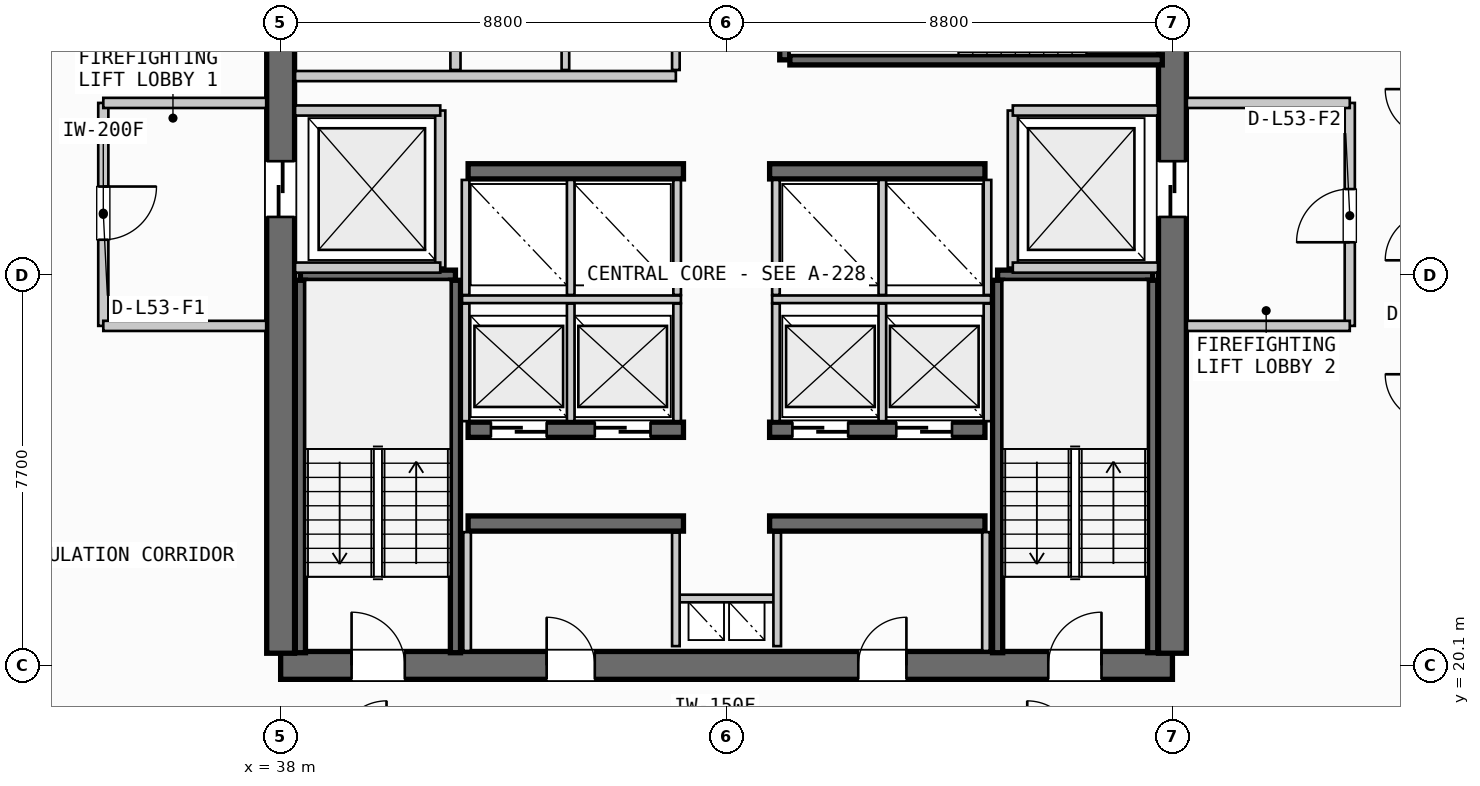
"""IFC4 building model, lengths in metres.
Left out: names, types, materials, properties, quantities, classifications, styles, units other than length and angle.
Written with IfcOpenShell. Run it as: python <this file> out.ifc"""

import sys

from ifc_helpers import new_model, si_unit, direction, frame, frame_2d, origin, place, context, subcontext, project, spatial, rectangle, extrude, source, transform, mapped, element, fill, save


model = new_model("IFC4")
c1 = context("Model", 3, precision=1e-05, world=origin(), true_north=direction((0.0, 1.0)))
c2 = subcontext(c1, "Body", "Model", "MODEL_VIEW")
j1 = project(units=[si_unit("LENGTHUNIT", "METRE"), si_unit("PLANEANGLEUNIT", "RADIAN")], contexts=[c1])
p1 = place(None, origin())
s1 = spatial("IfcSite", under=j1, at=p1, CompositionType="ELEMENT")
p2 = place(p1, origin())
s2 = spatial("IfcBuilding", under=s1, at=p2, CompositionType="ELEMENT")
p3 = place(p2, frame((0.0, 0.0, 204.4)))
s3 = spatial("IfcBuildingStorey", under=s2, at=p3, CompositionType="ELEMENT", Elevation=204.4)
p4 = place(p3, frame((38.0, 20.1, 0.0), z_axis=(0.0, 0.0, 1.0), x_axis=(1.0, 0.0, 0.0)))
e1 = element("IfcWall", 1, at=p4, inside=s3, PredefinedType="SHEAR", context=c2, shape_type="SweptSolid", body=[
    extrude(rectangle(XDim=17.6, YDim=0.55, at=frame_2d((8.8, 0.0))), origin(), (0.0, 0.0, 1.0), 3.26),
])
p5 = place(p4, frame((1.4, 0.0, 0.0)))
e2 = element("IfcOpeningElement", 2, at=p5, cuts=e1, PredefinedType="OPENING", context=c2, shape_type="SweptSolid", body=[
    extrude(rectangle(XDim=1.05, YDim=2.15, at=frame_2d((0.525, 1.075))), frame((0.0, 0.285, 0.0), z_axis=(0.0, -1.0, 0.0), x_axis=(1.0, 0.0, 0.0)), (0.0, 0.0, 1.0), 0.57),
])
p6 = place(p4, frame((15.15, 0.0, 0.0)))
e3 = element("IfcOpeningElement", 3, at=p6, cuts=e1, PredefinedType="OPENING", context=c2, shape_type="SweptSolid", body=[
    extrude(rectangle(XDim=1.05, YDim=2.15, at=frame_2d((0.525, 1.075))), frame((0.0, 0.285, 0.0), z_axis=(0.0, -1.0, 0.0), x_axis=(1.0, 0.0, 0.0)), (0.0, 0.0, 1.0), 0.57),
])
p7 = place(p4, frame((5.25, 0.0, 0.0)))
e4 = element("IfcOpeningElement", 4, at=p7, cuts=e1, PredefinedType="OPENING", context=c2, shape_type="SweptSolid", body=[
    extrude(rectangle(XDim=0.95, YDim=2.15, at=frame_2d((0.475, 1.075))), frame((0.0, 0.285, 0.0), z_axis=(0.0, -1.0, 0.0), x_axis=(1.0, 0.0, 0.0)), (0.0, 0.0, 1.0), 0.57),
])
p8 = place(p4, frame((11.4, 0.0, 0.0)))
e5 = element("IfcOpeningElement", 5, at=p8, cuts=e1, PredefinedType="OPENING", context=c2, shape_type="SweptSolid", body=[
    extrude(rectangle(XDim=0.95, YDim=2.15, at=frame_2d((0.475, 1.075))), frame((0.0, 0.285, 0.0), z_axis=(0.0, -1.0, 0.0), x_axis=(1.0, 0.0, 0.0)), (0.0, 0.0, 1.0), 0.57),
])
p9 = place(p3, frame((38.0, 35.26, 0.0), z_axis=(0.0, 0.0, 1.0), x_axis=(0.0, -1.0, 0.0)))
e6 = element("IfcWall", 6, at=p9, inside=s3, PredefinedType="SHEAR", context=c2, shape_type="SweptSolid", body=[
    extrude(rectangle(XDim=14.92, YDim=0.55, at=frame_2d((7.46, 0.0))), origin(), (0.0, 0.0, 1.0), 3.26),
])
p10 = place(p9, frame((5.21, 0.0, 0.0)))
e7 = element("IfcOpeningElement", 7, at=p10, cuts=e6, PredefinedType="OPENING", context=c2, shape_type="SweptSolid", body=[
    extrude(rectangle(XDim=1.1, YDim=2.2, at=frame_2d((0.55, 1.1))), frame((0.0, 0.285, 0.0), z_axis=(0.0, -1.0, 0.0), x_axis=(1.0, 0.0, 0.0)), (0.0, 0.0, 1.0), 0.57),
])
p11 = place(p3, frame((55.6, 20.34, 0.0), z_axis=(0.0, 0.0, 1.0), x_axis=(0.0, 1.0, 0.0)))
e8 = element("IfcWall", 8, at=p11, inside=s3, PredefinedType="SHEAR", context=c2, shape_type="SweptSolid", body=[
    extrude(rectangle(XDim=14.92, YDim=0.55, at=frame_2d((7.46, 0.0))), origin(), (0.0, 0.0, 1.0), 3.26),
])
p12 = place(p11, frame((12.71, 0.0, 0.0)))
e9 = element("IfcOpeningElement", 9, at=p12, cuts=e8, PredefinedType="OPENING", context=c2, shape_type="SweptSolid", body=[
    extrude(rectangle(XDim=1.05, YDim=2.15, at=frame_2d((0.525, 1.075))), frame((0.0, 0.285, 0.0), z_axis=(0.0, -1.0, 0.0), x_axis=(1.0, 0.0, 0.0)), (0.0, 0.0, 1.0), 0.57),
])
p13 = place(p11, frame((8.61, 0.0, 0.0)))
e10 = element("IfcOpeningElement", 10, at=p13, cuts=e8, PredefinedType="OPENING", context=c2, shape_type="SweptSolid", body=[
    extrude(rectangle(XDim=1.1, YDim=2.2, at=frame_2d((0.55, 1.1))), frame((0.0, 0.285, 0.0), z_axis=(0.0, -1.0, 0.0), x_axis=(1.0, 0.0, 0.0)), (0.0, 0.0, 1.0), 0.57),
])
for number, where, z_axis, x_axis in (
    (11, (41.7, 22.9, 0.0), (0.0, 0.0, 1.0), (1.0, 0.0, 0.0)),
    (12, (47.65, 22.9, 0.0), (0.0, 0.0, 1.0), (1.0, 0.0, 0.0)),
):
    element("IfcWall", number, at=place(p3, frame(where, z_axis=z_axis, x_axis=x_axis)), inside=s3, PredefinedType="SHEAR", context=c2, shape_type="SweptSolid", body=[
        extrude(rectangle(XDim=4.25, YDim=0.3, at=frame_2d((2.125, 0.0))), origin(), (0.0, 0.0, 1.0), 3.26),
    ])
p14 = place(p3, frame((41.7, 24.75, 0.0), z_axis=(0.0, 0.0, 1.0), x_axis=(1.0, 0.0, 0.0)))
e13 = element("IfcWall", 13, at=p14, inside=s3, PredefinedType="SHEAR", context=c2, shape_type="SweptSolid", body=[
    extrude(rectangle(XDim=4.25, YDim=0.3, at=frame_2d((2.125, 0.0))), origin(), (0.0, 0.0, 1.0), 3.26),
])
p15 = place(p14, frame((0.45, 0.0, 0.0)))
e14 = element("IfcOpeningElement", 14, at=p15, cuts=e13, PredefinedType="OPENING", context=c2, shape_type="SweptSolid", body=[
    extrude(rectangle(XDim=1.1, YDim=2.2, at=frame_2d((0.55, 1.1))), frame((0.0, 0.16, 0.0), z_axis=(0.0, -1.0, 0.0), x_axis=(1.0, 0.0, 0.0)), (0.0, 0.0, 1.0), 0.32),
])
p16 = place(p14, frame((2.5, 0.0, 0.0)))
e15 = element("IfcOpeningElement", 15, at=p16, cuts=e13, PredefinedType="OPENING", context=c2, shape_type="SweptSolid", body=[
    extrude(rectangle(XDim=1.1, YDim=2.2, at=frame_2d((0.55, 1.1))), frame((0.0, 0.16, 0.0), z_axis=(0.0, -1.0, 0.0), x_axis=(1.0, 0.0, 0.0)), (0.0, 0.0, 1.0), 0.32),
])
p17 = place(p3, frame((47.65, 24.75, 0.0), z_axis=(0.0, 0.0, 1.0), x_axis=(1.0, 0.0, 0.0)))
e16 = element("IfcWall", 16, at=p17, inside=s3, PredefinedType="SHEAR", context=c2, shape_type="SweptSolid", body=[
    extrude(rectangle(XDim=4.25, YDim=0.3, at=frame_2d((2.125, 0.0))), origin(), (0.0, 0.0, 1.0), 3.26),
])
p18 = place(p17, frame((0.45, 0.0, 0.0)))
e17 = element("IfcOpeningElement", 17, at=p18, cuts=e16, PredefinedType="OPENING", context=c2, shape_type="SweptSolid", body=[
    extrude(rectangle(XDim=1.1, YDim=2.2, at=frame_2d((0.55, 1.1))), frame((0.0, 0.16, 0.0), z_axis=(0.0, -1.0, 0.0), x_axis=(1.0, 0.0, 0.0)), (0.0, 0.0, 1.0), 0.32),
])
p19 = place(p17, frame((2.5, 0.0, 0.0)))
e18 = element("IfcOpeningElement", 18, at=p19, cuts=e16, PredefinedType="OPENING", context=c2, shape_type="SweptSolid", body=[
    extrude(rectangle(XDim=1.1, YDim=2.2, at=frame_2d((0.55, 1.1))), frame((0.0, 0.16, 0.0), z_axis=(0.0, -1.0, 0.0), x_axis=(1.0, 0.0, 0.0)), (0.0, 0.0, 1.0), 0.32),
])
for number, where, z_axis, x_axis in (
    (19, (41.7, 29.85, 0.0), (0.0, 0.0, 1.0), (1.0, 0.0, 0.0)),
    (20, (47.65, 29.85, 0.0), (0.0, 0.0, 1.0), (1.0, 0.0, 0.0)),
):
    element("IfcWall", number, at=place(p3, frame(where, z_axis=z_axis, x_axis=x_axis)), inside=s3, PredefinedType="SHEAR", context=c2, shape_type="SweptSolid", body=[
        extrude(rectangle(XDim=4.25, YDim=0.3, at=frame_2d((2.125, 0.0))), origin(), (0.0, 0.0, 1.0), 3.26),
    ])
p20 = place(p3, frame((38.39, 27.8, 0.0), z_axis=(0.0, 0.0, 1.0), x_axis=(1.0, 0.0, 0.0)))
e21 = element("IfcWall", 21, at=p20, inside=s3, PredefinedType="SHEAR", context=c2, shape_type="SweptSolid", body=[
    extrude(rectangle(XDim=3.06, YDim=0.2, at=frame_2d((1.53, 0.0))), origin(), (0.0, 0.0, 1.0), 3.26),
])
for number, where, z_axis, x_axis in (
    (22, (41.45, 27.7, 0.0), (0.0, 0.0, 1.0), (0.0, -1.0, 0.0)),
    (23, (38.39, 20.35, 0.0), (0.0, 0.0, 1.0), (0.0, 1.0, 0.0)),
):
    element("IfcWall", number, at=place(p3, frame(where, z_axis=z_axis, x_axis=x_axis)), inside=s3, PredefinedType="SHEAR", context=c2, shape_type="SweptSolid", body=[
        extrude(rectangle(XDim=7.35, YDim=0.2, at=frame_2d((3.675, 0.0))), origin(), (0.0, 0.0, 1.0), 3.26),
    ])
p21 = place(p3, frame((52.15, 27.8, 0.0), z_axis=(0.0, 0.0, 1.0), x_axis=(1.0, 0.0, 0.0)))
e24 = element("IfcWall", 24, at=p21, inside=s3, PredefinedType="SHEAR", context=c2, shape_type="SweptSolid", body=[
    extrude(rectangle(XDim=3.06, YDim=0.2, at=frame_2d((1.53, 0.0))), origin(), (0.0, 0.0, 1.0), 3.26),
])
for number, where, z_axis, x_axis in (
    (25, (55.21, 27.7, 0.0), (0.0, 0.0, 1.0), (0.0, -1.0, 0.0)),
    (26, (52.15, 20.35, 0.0), (0.0, 0.0, 1.0), (0.0, 1.0, 0.0)),
):
    element("IfcWall", number, at=place(p3, frame(where, z_axis=z_axis, x_axis=x_axis)), inside=s3, PredefinedType="SHEAR", context=c2, shape_type="SweptSolid", body=[
        extrude(rectangle(XDim=7.35, YDim=0.2, at=frame_2d((3.675, 0.0))), origin(), (0.0, 0.0, 1.0), 3.26),
    ])
p22 = place(p3, frame((47.95, 32.05, 0.0), z_axis=(0.0, 0.0, 1.0), x_axis=(0.0, 1.0, 0.0)))
e27 = element("IfcWall", 27, at=p22, inside=s3, PredefinedType="SHEAR", context=c2, shape_type="SweptSolid", body=[
    extrude(rectangle(XDim=3.06, YDim=0.2, at=frame_2d((1.53, 0.0))), origin(), (0.0, 0.0, 1.0), 3.26),
])
p23 = place(p3, frame((55.4, 32.05, 0.0), z_axis=(0.0, 0.0, 1.0), x_axis=(-1.0, 0.0, 0.0)))
e28 = element("IfcWall", 28, at=p23, inside=s3, PredefinedType="SHEAR", context=c2, shape_type="SweptSolid", body=[
    extrude(rectangle(XDim=7.35, YDim=0.2, at=frame_2d((3.675, 0.0))), origin(), (0.0, 0.0, 1.0), 3.26),
])
p24 = place(p3, frame((45.8, 21.42, 0.0), z_axis=(0.0, 0.0, 1.0), x_axis=(1.0, 0.0, 0.0)))
e29 = element("IfcWall", 29, at=p24, inside=s3, PredefinedType="PARTITIONING", context=c2, shape_type="SweptSolid", body=[
    extrude(rectangle(XDim=2.0, YDim=0.15, at=frame_2d((1.0, 0.0))), origin(), (0.0, 0.0, 1.0), 2.595),
])
for number, where, z_axis, x_axis in (
    (30, (45.8, 20.48, 0.0), (0.0, 0.0, 1.0), (0.0, 1.0, 0.0)),
    (31, (47.8, 20.48, 0.0), (0.0, 0.0, 1.0), (0.0, 1.0, 0.0)),
):
    element("IfcWall", number, at=place(p3, frame(where, z_axis=z_axis, x_axis=x_axis)), inside=s3, PredefinedType="PARTITIONING", context=c2, shape_type="SweptSolid", body=[
        extrude(rectangle(XDim=2.24, YDim=0.15, at=frame_2d((1.12, 0.0))), origin(), (0.0, 0.0, 1.0), 2.595),
    ])
p25 = place(p3, frame((41.15, 27.95, 0.0), z_axis=(0.0, 0.0, 1.0), x_axis=(0.0, 1.0, 0.0)))
e32 = element("IfcWall", 32, at=p25, inside=s3, PredefinedType="PARTITIONING", context=c2, shape_type="SweptSolid", body=[
    extrude(rectangle(XDim=3.1, YDim=0.2, at=frame_2d((1.55, 0.0))), origin(), (0.0, 0.0, 1.0), 2.595),
])
for number, where, z_axis, x_axis in (
    (33, (38.285, 27.95, 0.0), (0.0, 0.0, 1.0), (1.0, 0.0, 0.0)),
    (34, (38.285, 31.05, 0.0), (0.0, 0.0, 1.0), (1.0, 0.0, 0.0)),
):
    element("IfcWall", number, at=place(p3, frame(where, z_axis=z_axis, x_axis=x_axis)), inside=s3, PredefinedType="PARTITIONING", context=c2, shape_type="SweptSolid", body=[
        extrude(rectangle(XDim=2.865, YDim=0.2, at=frame_2d((1.433, 0.0))), origin(), (0.0, 0.0, 1.0), 2.595),
    ])
p26 = place(p3, frame((34.5, 31.2, 0.0), z_axis=(0.0, 0.0, 1.0), x_axis=(0.0, -1.0, 0.0)))
e35 = element("IfcWall", 35, at=p26, inside=s3, PredefinedType="PARTITIONING", context=c2, shape_type="SweptSolid", body=[
    extrude(rectangle(XDim=4.4, YDim=0.2, at=frame_2d((2.2, 0.0))), origin(), (0.0, 0.0, 1.0), 2.595),
])
p27 = place(p26, frame((1.65, 0.0, 0.0)))
e36 = element("IfcOpeningElement", 36, at=p27, cuts=e35, PredefinedType="OPENING", context=c2, shape_type="SweptSolid", body=[
    extrude(rectangle(XDim=1.05, YDim=2.15, at=frame_2d((0.525, 1.075))), frame((0.0, 0.11, 0.0), z_axis=(0.0, -1.0, 0.0), x_axis=(1.0, 0.0, 0.0)), (0.0, 0.0, 1.0), 0.22),
])
for number, where, z_axis, x_axis in (
    (37, (34.5, 26.8, 0.0), (0.0, 0.0, 1.0), (1.0, 0.0, 0.0)),
    (38, (34.5, 31.2, 0.0), (0.0, 0.0, 1.0), (1.0, 0.0, 0.0)),
):
    element("IfcWall", number, at=place(p3, frame(where, z_axis=z_axis, x_axis=x_axis)), inside=s3, PredefinedType="PARTITIONING", context=c2, shape_type="SweptSolid", body=[
        extrude(rectangle(XDim=3.215, YDim=0.2, at=frame_2d((1.607, 0.0))), origin(), (0.0, 0.0, 1.0), 2.595),
    ])
p28 = place(p3, frame((52.45, 27.95, 0.0), z_axis=(0.0, 0.0, 1.0), x_axis=(0.0, 1.0, 0.0)))
e39 = element("IfcWall", 39, at=p28, inside=s3, PredefinedType="PARTITIONING", context=c2, shape_type="SweptSolid", body=[
    extrude(rectangle(XDim=3.1, YDim=0.2, at=frame_2d((1.55, 0.0))), origin(), (0.0, 0.0, 1.0), 2.595),
])
for number, where, z_axis, x_axis in (
    (40, (52.45, 27.95, 0.0), (0.0, 0.0, 1.0), (1.0, 0.0, 0.0)),
    (41, (52.45, 31.05, 0.0), (0.0, 0.0, 1.0), (1.0, 0.0, 0.0)),
):
    element("IfcWall", number, at=place(p3, frame(where, z_axis=z_axis, x_axis=x_axis)), inside=s3, PredefinedType="PARTITIONING", context=c2, shape_type="SweptSolid", body=[
        extrude(rectangle(XDim=2.865, YDim=0.2, at=frame_2d((1.433, 0.0))), origin(), (0.0, 0.0, 1.0), 2.595),
    ])
p29 = place(p3, frame((59.1, 26.8, 0.0), z_axis=(0.0, 0.0, 1.0), x_axis=(0.0, 1.0, 0.0)))
e42 = element("IfcWall", 42, at=p29, inside=s3, PredefinedType="PARTITIONING", context=c2, shape_type="SweptSolid", body=[
    extrude(rectangle(XDim=4.4, YDim=0.2, at=frame_2d((2.2, 0.0))), origin(), (0.0, 0.0, 1.0), 2.595),
])
p30 = place(p29, frame((1.65, 0.0, 0.0)))
e43 = element("IfcOpeningElement", 43, at=p30, cuts=e42, PredefinedType="OPENING", context=c2, shape_type="SweptSolid", body=[
    extrude(rectangle(XDim=1.05, YDim=2.15, at=frame_2d((0.525, 1.075))), frame((0.0, 0.11, 0.0), z_axis=(0.0, -1.0, 0.0), x_axis=(1.0, 0.0, 0.0)), (0.0, 0.0, 1.0), 0.22),
])
for number, where, z_axis, x_axis in (
    (44, (55.885, 26.8, 0.0), (0.0, 0.0, 1.0), (1.0, 0.0, 0.0)),
    (45, (55.885, 31.2, 0.0), (0.0, 0.0, 1.0), (1.0, 0.0, 0.0)),
):
    element("IfcWall", number, at=place(p3, frame(where, z_axis=z_axis, x_axis=x_axis)), inside=s3, PredefinedType="PARTITIONING", context=c2, shape_type="SweptSolid", body=[
        extrude(rectangle(XDim=3.215, YDim=0.2, at=frame_2d((1.607, 0.0))), origin(), (0.0, 0.0, 1.0), 2.595),
    ])
for number, where, z_axis, x_axis in (
    (46, (41.68, 20.385, 0.0), (0.0, 0.0, 1.0), (0.0, 1.0, 0.0)),
    (47, (51.92, 20.385, 0.0), (0.0, 0.0, 1.0), (0.0, 1.0, 0.0)),
):
    element("IfcWall", number, at=place(p3, frame(where, z_axis=z_axis, x_axis=x_axis)), inside=s3, PredefinedType="PARTITIONING", context=c2, shape_type="SweptSolid", body=[
        extrude(rectangle(XDim=2.345, YDim=0.15, at=frame_2d((1.172, 0.0))), origin(), (0.0, 0.0, 1.0), 2.595),
    ])
p31 = place(p3, frame((41.58, 27.325, 0.0), z_axis=(0.0, 0.0, 1.0), x_axis=(1.0, 0.0, 0.0)))
e48 = element("IfcWall", 48, at=p31, inside=s3, PredefinedType="PARTITIONING", context=c2, shape_type="SweptSolid", body=[
    extrude(rectangle(XDim=4.32, YDim=0.15, at=frame_2d((2.16, 0.0))), origin(), (0.0, 0.0, 1.0), 2.595),
])
p32 = place(p3, frame((47.7, 27.325, 0.0), z_axis=(0.0, 0.0, 1.0), x_axis=(1.0, 0.0, 0.0)))
e49 = element("IfcWall", 49, at=p32, inside=s3, PredefinedType="PARTITIONING", context=c2, shape_type="SweptSolid", body=[
    extrude(rectangle(XDim=4.32, YDim=0.15, at=frame_2d((2.16, 0.0))), origin(), (0.0, 0.0, 1.0), 2.595),
])
for number, where, z_axis, x_axis in (
    (50, (41.65, 24.92, 0.0), (0.0, 0.0, 1.0), (0.0, 1.0, 0.0)),
    (51, (43.725, 24.92, 0.0), (0.0, 0.0, 1.0), (0.0, 1.0, 0.0)),
    (52, (45.825, 24.92, 0.0), (0.0, 0.0, 1.0), (0.0, 1.0, 0.0)),
    (53, (47.775, 24.92, 0.0), (0.0, 0.0, 1.0), (0.0, 1.0, 0.0)),
    (54, (49.875, 24.92, 0.0), (0.0, 0.0, 1.0), (0.0, 1.0, 0.0)),
    (55, (51.95, 24.92, 0.0), (0.0, 0.0, 1.0), (0.0, 1.0, 0.0)),
):
    element("IfcWall", number, at=place(p3, frame(where, z_axis=z_axis, x_axis=x_axis)), inside=s3, PredefinedType="PARTITIONING", context=c2, shape_type="SweptSolid", body=[
        extrude(rectangle(XDim=2.32, YDim=0.15, at=frame_2d((1.16, 0.0))), origin(), (0.0, 0.0, 1.0), 2.595),
    ])
for number, where, z_axis, x_axis in (
    (56, (41.65, 27.41, 0.0), (0.0, 0.0, 1.0), (0.0, 1.0, 0.0)),
    (57, (43.725, 27.41, 0.0), (0.0, 0.0, 1.0), (0.0, 1.0, 0.0)),
    (58, (45.825, 27.41, 0.0), (0.0, 0.0, 1.0), (0.0, 1.0, 0.0)),
    (59, (47.775, 27.41, 0.0), (0.0, 0.0, 1.0), (0.0, 1.0, 0.0)),
    (60, (49.875, 27.41, 0.0), (0.0, 0.0, 1.0), (0.0, 1.0, 0.0)),
    (61, (51.95, 27.41, 0.0), (0.0, 0.0, 1.0), (0.0, 1.0, 0.0)),
):
    element("IfcWall", number, at=place(p3, frame(where, z_axis=z_axis, x_axis=x_axis)), inside=s3, PredefinedType="PARTITIONING", context=c2, shape_type="SweptSolid", body=[
        extrude(rectangle(XDim=2.27, YDim=0.15, at=frame_2d((1.135, 0.0))), origin(), (0.0, 0.0, 1.0), 2.595),
    ])
p33 = place(p3, frame((41.45, 31.85, 0.0), z_axis=(0.0, 0.0, 1.0), x_axis=(0.0, 1.0, 0.0)))
e62 = element("IfcWall", 62, at=p33, inside=s3, PredefinedType="PARTITIONING", context=c2, shape_type="SweptSolid", body=[
    extrude(rectangle(XDim=3.365, YDim=0.2, at=frame_2d((1.683, 0.0))), origin(), (0.0, 0.0, 1.0), 2.595),
])
p34 = place(p3, frame((38.285, 31.73, 0.0), z_axis=(0.0, 0.0, 1.0), x_axis=(1.0, 0.0, 0.0)))
e63 = element("IfcWall", 63, at=p34, inside=s3, PredefinedType="PARTITIONING", context=c2, shape_type="SweptSolid", body=[
    extrude(rectangle(XDim=7.515, YDim=0.2, at=frame_2d((3.758, 0.0))), origin(), (0.0, 0.0, 1.0), 2.595),
])
p35 = place(p3, frame((45.8, 31.85, 0.0), z_axis=(0.0, 0.0, 1.0), x_axis=(0.0, 1.0, 0.0)))
e64 = element("IfcWall", 64, at=p35, inside=s3, PredefinedType="PARTITIONING", context=c2, shape_type="SweptSolid", body=[
    extrude(rectangle(XDim=3.365, YDim=0.15, at=frame_2d((1.683, 0.0))), origin(), (0.0, 0.0, 1.0), 2.595),
])
p36 = place(p3, frame((43.62, 31.85, 0.0), z_axis=(0.0, 0.0, 1.0), x_axis=(0.0, 1.0, 0.0)))
e65 = element("IfcWall", 65, at=p36, inside=s3, PredefinedType="PLUMBINGWALL", context=c2, shape_type="SweptSolid", body=[
    extrude(rectangle(XDim=3.365, YDim=0.15, at=frame_2d((1.683, 0.0))), origin(), (0.0, 0.0, 1.0), 2.595),
])
m1 = source(origin(), c2, "Body", "SweptSolid", [
    extrude(rectangle(XDim=1.05, YDim=2.15, at=frame_2d((0.525, 1.075))), frame((0.0, 0.025, 0.0), z_axis=(0.0, -1.0, 0.0), x_axis=(1.0, 0.0, 0.0)), (0.0, 0.0, 1.0), 0.05),
])
p37 = place(p5, origin())
e66 = element("IfcDoor", 66, at=p37, inside=s3, OperationType="SINGLE_SWING_LEFT", PredefinedType="DOOR", context=c2, shape_type="MappedRepresentation", body=[
    mapped(m1, transform((0.0, 0.0, 0.0), scale=1.0)),
])
fill(e2, e66)
p38 = place(p6, origin())
e67 = element("IfcDoor", 67, at=p38, inside=s3, OperationType="SINGLE_SWING_RIGHT", PredefinedType="DOOR", context=c2, shape_type="MappedRepresentation", body=[
    mapped(m1, transform((0.0, 0.0, 0.0), scale=1.0)),
])
fill(e3, e67)
m2 = source(origin(), c2, "Body", "SweptSolid", [
    extrude(rectangle(XDim=1.1, YDim=2.2, at=frame_2d((0.55, 1.1))), frame((0.0, 0.025, 0.0), z_axis=(0.0, -1.0, 0.0), x_axis=(1.0, 0.0, 0.0)), (0.0, 0.0, 1.0), 0.05),
])
p39 = place(p10, origin())
e68 = element("IfcDoor", 68, at=p39, inside=s3, OperationType="SLIDING_TO_LEFT", PredefinedType="DOOR", context=c2, shape_type="MappedRepresentation", body=[
    mapped(m2, transform((0.0, 0.0, 0.0), scale=1.0)),
])
fill(e7, e68)
p40 = place(p13, origin())
e69 = element("IfcDoor", 69, at=p40, inside=s3, OperationType="SLIDING_TO_RIGHT", PredefinedType="DOOR", context=c2, shape_type="MappedRepresentation", body=[
    mapped(m2, transform((0.0, 0.0, 0.0), scale=1.0)),
])
fill(e10, e69)
m3 = source(origin(), c2, "Body", "SweptSolid", [
    extrude(rectangle(XDim=0.95, YDim=2.15, at=frame_2d((0.475, 1.075))), frame((0.0, 0.025, 0.0), z_axis=(0.0, -1.0, 0.0), x_axis=(1.0, 0.0, 0.0)), (0.0, 0.0, 1.0), 0.05),
])
p41 = place(p7, origin())
e70 = element("IfcDoor", 70, at=p41, inside=s3, OperationType="SINGLE_SWING_LEFT", PredefinedType="DOOR", context=c2, shape_type="MappedRepresentation", body=[
    mapped(m3, transform((0.0, 0.0, 0.0), scale=1.0)),
])
fill(e4, e70)
p42 = place(p8, origin())
e71 = element("IfcDoor", 71, at=p42, inside=s3, OperationType="SINGLE_SWING_RIGHT", PredefinedType="DOOR", context=c2, shape_type="MappedRepresentation", body=[
    mapped(m3, transform((0.0, 0.0, 0.0), scale=1.0)),
])
fill(e5, e71)
p43 = place(p15, origin())
e72 = element("IfcDoor", 72, at=p43, inside=s3, OperationType="SLIDING_TO_RIGHT", PredefinedType="DOOR", context=c2, shape_type="MappedRepresentation", body=[
    mapped(m2, transform((0.0, 0.0, 0.0), scale=1.0)),
])
fill(e14, e72)
p44 = place(p16, origin())
e73 = element("IfcDoor", 73, at=p44, inside=s3, OperationType="SLIDING_TO_RIGHT", PredefinedType="DOOR", context=c2, shape_type="MappedRepresentation", body=[
    mapped(m2, transform((0.0, 0.0, 0.0), scale=1.0)),
])
fill(e15, e73)
p45 = place(p18, origin())
e74 = element("IfcDoor", 74, at=p45, inside=s3, OperationType="SLIDING_TO_RIGHT", PredefinedType="DOOR", context=c2, shape_type="MappedRepresentation", body=[
    mapped(m2, transform((0.0, 0.0, 0.0), scale=1.0)),
])
fill(e17, e74)
p46 = place(p19, origin())
e75 = element("IfcDoor", 75, at=p46, inside=s3, OperationType="SLIDING_TO_RIGHT", PredefinedType="DOOR", context=c2, shape_type="MappedRepresentation", body=[
    mapped(m2, transform((0.0, 0.0, 0.0), scale=1.0)),
])
fill(e18, e75)
p47 = place(p27, origin())
e76 = element("IfcDoor", 76, at=p47, inside=s3, OperationType="SINGLE_SWING_LEFT", PredefinedType="DOOR", context=c2, shape_type="MappedRepresentation", body=[
    mapped(m1, transform((0.0, 0.0, 0.0), scale=1.0)),
])
fill(e36, e76)
p48 = place(p30, origin())
e77 = element("IfcDoor", 77, at=p48, inside=s3, OperationType="SINGLE_SWING_LEFT", PredefinedType="DOOR", context=c2, shape_type="MappedRepresentation", body=[
    mapped(m1, transform((0.0, 0.0, 0.0), scale=1.0)),
])
fill(e43, e77)
save(model, sys.argv[1])
